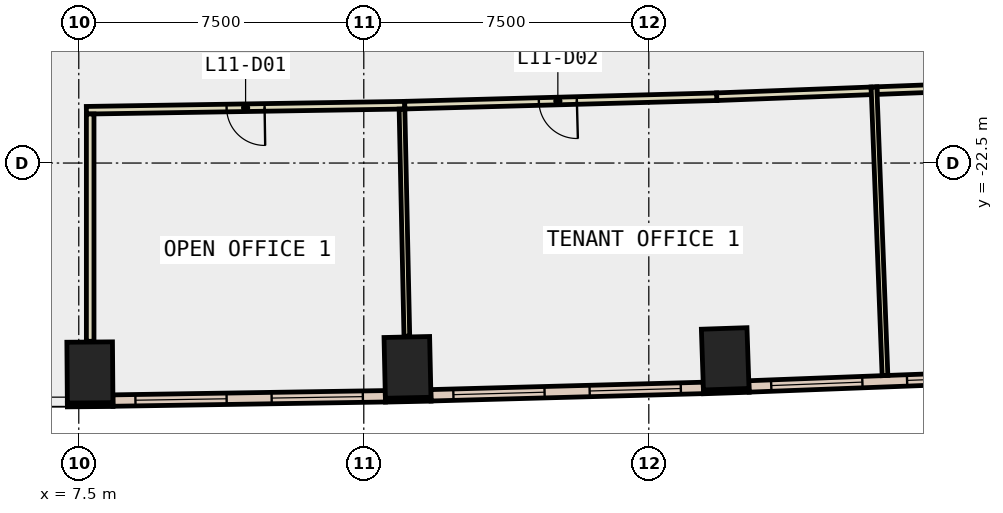
"""IFC4 building model, lengths in metres.
Left out: names, types, materials, properties, quantities, classifications, styles, units other than length and angle.
Written with IfcOpenShell. Run it as: python <this file> out.ifc"""

import sys

from ifc_helpers import new_model, si_unit, direction, frame, frame_2d, origin, origin_2d, place, context, subcontext, project, spatial, rectangle, extrude, element, fill, save


model = new_model("IFC4")
c1 = context("Model", 3, precision=1e-05, world=origin(), true_north=direction((0.0, 1.0)))
c2 = subcontext(c1, "Body", "Model", "MODEL_VIEW")
j1 = project(units=[si_unit("LENGTHUNIT", "METRE"), si_unit("PLANEANGLEUNIT", "RADIAN")], contexts=[c1])
p1 = place(None, origin())
s1 = spatial("IfcSite", under=j1, at=p1, CompositionType="ELEMENT")
p2 = place(p1, origin())
s2 = spatial("IfcBuilding", under=s1, at=p2, CompositionType="ELEMENT")
p3 = place(p2, frame((0.0, 0.0, 56.0)))
s3 = spatial("IfcBuildingStorey", under=s2, at=p3, CompositionType="ELEMENT", Elevation=56.0)
for number, where, z_axis, x_axis in (
    (1, (7.793, -28.01, -0.4), (0.0, 0.0, 1.0), (1.0, 0.008, 0.0)),
    (2, (16.15, -27.877, -0.4), (0.0, 0.0, 1.0), (1.0, 0.022, 0.0)),
    (3, (24.51, -27.652, -0.4), (0.0, 0.0, 1.0), (0.999, 0.034, 0.0)),
):
    element("IfcColumn", number, at=place(p3, frame(where, z_axis=z_axis, x_axis=x_axis)), inside=s3, PredefinedType="COLUMN", context=c2, shape_type="SweptSolid", body=[
        extrude(rectangle(XDim=1.2, YDim=1.6, at=origin_2d()), origin(), (0.0, 0.0, 1.0), 4.2),
    ])
p4 = place(p3, frame((7.2, -28.865, 0.0), z_axis=(0.0, 0.0, 1.0), x_axis=(0.999965208912, 0.008341520563, 0.0)))
e4 = element("IfcWall", 4, at=p4, inside=s3, PredefinedType="STANDARD", context=c2, shape_type="SweptSolid", body=[
    extrude(rectangle(XDim=1.2, YDim=0.1, at=frame_2d((0.6, 0.0))), origin(), (0.0, 0.0, 1.0), 3.8),
])
p5 = place(p3, frame((15.569, -28.74, 0.0), z_axis=(0.0, 0.0, 1.0), x_axis=(0.99976752127, 0.021561618973, 0.0)))
e5 = element("IfcWall", 5, at=p5, inside=s3, PredefinedType="STANDARD", context=c2, shape_type="SweptSolid", body=[
    extrude(rectangle(XDim=1.2, YDim=0.1, at=frame_2d((0.6, 0.0))), origin(), (0.0, 0.0, 1.0), 3.8),
])
p6 = place(p3, frame((23.939, -28.521, 0.0), z_axis=(0.0, 0.0, 1.0), x_axis=(0.999442872267, 0.03337581573, 0.0)))
e6 = element("IfcWall", 6, at=p6, inside=s3, PredefinedType="STANDARD", context=c2, shape_type="SweptSolid", body=[
    extrude(rectangle(XDim=1.2, YDim=0.1, at=frame_2d((0.6, 0.0))), origin(), (0.0, 0.0, 1.0), 3.8),
])
p7 = place(p3, frame((8.398, -28.75, 0.0), z_axis=(0.0, 0.0, 1.0), x_axis=(0.999875756772, 0.015762963512, 0.0)))
e7 = element("IfcWall", 7, at=p7, inside=s3, PredefinedType="STANDARD", context=c2, shape_type="SweptSolid", body=[
    extrude(rectangle(XDim=7.171, YDim=0.3, at=frame_2d((3.585, 0.0))), origin(), (0.0, 0.0, 1.0), 3.8),
])
p8 = place(p7, frame((0.593, 0.0, 0.9)))
e8 = element("IfcOpeningElement", 8, at=p8, cuts=e7, PredefinedType="OPENING", context=c2, shape_type="SweptSolid", body=[
    extrude(rectangle(XDim=2.4, YDim=2.6, at=frame_2d((1.2, 1.3))), frame((0.0, 0.16, 0.0), z_axis=(0.0, -1.0, 0.0), x_axis=(1.0, 0.0, 0.0)), (0.0, 0.0, 1.0), 0.32),
])
p9 = place(p7, frame((4.178, 0.0, 0.9)))
e9 = element("IfcOpeningElement", 9, at=p9, cuts=e7, PredefinedType="OPENING", context=c2, shape_type="SweptSolid", body=[
    extrude(rectangle(XDim=2.4, YDim=2.6, at=frame_2d((1.2, 1.3))), frame((0.0, 0.16, 0.0), z_axis=(0.0, -1.0, 0.0), x_axis=(1.0, 0.0, 0.0)), (0.0, 0.0, 1.0), 0.32),
])
p10 = place(p3, frame((16.765, -28.611, 0.0), z_axis=(0.0, 0.0, 1.0), x_axis=(0.999633925798, 0.027055764512, 0.0)))
e10 = element("IfcWall", 10, at=p10, inside=s3, PredefinedType="STANDARD", context=c2, shape_type="SweptSolid", body=[
    extrude(rectangle(XDim=7.174, YDim=0.3, at=frame_2d((3.587, 0.0))), origin(), (0.0, 0.0, 1.0), 3.8),
])
p11 = place(p10, frame((0.593, 0.0, 0.9)))
e11 = element("IfcOpeningElement", 11, at=p11, cuts=e10, PredefinedType="OPENING", context=c2, shape_type="SweptSolid", body=[
    extrude(rectangle(XDim=2.4, YDim=2.6, at=frame_2d((1.2, 1.3))), frame((0.0, 0.16, 0.0), z_axis=(0.0, -1.0, 0.0), x_axis=(1.0, 0.0, 0.0)), (0.0, 0.0, 1.0), 0.32),
])
p12 = place(p10, frame((4.18, 0.0, 0.9)))
e12 = element("IfcOpeningElement", 12, at=p12, cuts=e10, PredefinedType="OPENING", context=c2, shape_type="SweptSolid", body=[
    extrude(rectangle(XDim=2.4, YDim=2.6, at=frame_2d((1.2, 1.3))), frame((0.0, 0.16, 0.0), z_axis=(0.0, -1.0, 0.0), x_axis=(1.0, 0.0, 0.0)), (0.0, 0.0, 1.0), 0.32),
])
p13 = place(p3, frame((25.134, -28.378, 0.0), z_axis=(0.0, 0.0, 1.0), x_axis=(0.999276920032, 0.038021534562, 0.0)))
e13 = element("IfcWall", 13, at=p13, inside=s3, PredefinedType="STANDARD", context=c2, shape_type="SweptSolid", body=[
    extrude(rectangle(XDim=7.153, YDim=0.3, at=frame_2d((3.577, 0.0))), origin(), (0.0, 0.0, 1.0), 3.8),
])
p14 = place(p13, frame((0.588, 0.0, 0.9)))
e14 = element("IfcOpeningElement", 14, at=p14, cuts=e13, PredefinedType="OPENING", context=c2, shape_type="SweptSolid", body=[
    extrude(rectangle(XDim=2.4, YDim=2.6, at=frame_2d((1.2, 1.3))), frame((0.0, 0.16, 0.0), z_axis=(0.0, -1.0, 0.0), x_axis=(1.0, 0.0, 0.0)), (0.0, 0.0, 1.0), 0.32),
])
p15 = place(p13, frame((4.165, 0.0, 0.9)))
e15 = element("IfcOpeningElement", 15, at=p15, cuts=e13, PredefinedType="OPENING", context=c2, shape_type="SweptSolid", body=[
    extrude(rectangle(XDim=2.4, YDim=2.6, at=frame_2d((1.2, 1.3))), frame((0.0, 0.16, 0.0), z_axis=(0.0, -1.0, 0.0), x_axis=(1.0, 0.0, 0.0)), (0.0, 0.0, 1.0), 0.32),
])
p16 = place(p3, frame((16.078, -20.978, 0.0), z_axis=(0.0, 0.0, 1.0), x_axis=(-0.999873907997, -0.015879801838, 0.0)))
e16 = element("IfcWall", 16, at=p16, inside=s3, PredefinedType="PARTITIONING", context=c2, shape_type="SweptSolid", body=[
    extrude(rectangle(XDim=8.379, YDim=0.2, at=frame_2d((4.189, 0.0))), origin(), (0.0, 0.0, 1.0), 3.8),
])
p17 = place(p16, frame((3.689, 0.0, 0.0)))
e17 = element("IfcOpeningElement", 17, at=p17, cuts=e16, PredefinedType="OPENING", context=c2, shape_type="SweptSolid", body=[
    extrude(rectangle(XDim=1.0, YDim=2.1, at=frame_2d((0.5, 1.05))), frame((0.0, 0.11, 0.0), z_axis=(0.0, -1.0, 0.0), x_axis=(1.0, 0.0, 0.0)), (0.0, 0.0, 1.0), 0.22),
])
p18 = place(p3, frame((28.354, -20.6, 0.0), z_axis=(0.0, 0.0, 1.0), x_axis=(-0.999276945714, -0.038020859604, 0.0)))
e18 = element("IfcWall", 18, at=p18, inside=s3, PredefinedType="PARTITIONING", context=c2, shape_type="SweptSolid", body=[
    extrude(rectangle(XDim=4.071, YDim=0.2, at=frame_2d((2.036, 0.0))), origin(), (0.0, 0.0, 1.0), 3.8),
])
p19 = place(p3, frame((24.286, -20.755, 0.0), z_axis=(0.0, 0.0, 1.0), x_axis=(-0.999633883909, -0.027057312146, 0.0)))
e19 = element("IfcWall", 19, at=p19, inside=s3, PredefinedType="PARTITIONING", context=c2, shape_type="SweptSolid", body=[
    extrude(rectangle(XDim=8.211, YDim=0.2, at=frame_2d((4.105, 0.0))), origin(), (0.0, 0.0, 1.0), 3.8),
])
p20 = place(p19, frame((3.681, 0.0, 0.0)))
e20 = element("IfcOpeningElement", 20, at=p20, cuts=e19, PredefinedType="OPENING", context=c2, shape_type="SweptSolid", body=[
    extrude(rectangle(XDim=1.0, YDim=2.1, at=frame_2d((0.5, 1.05))), frame((0.0, 0.11, 0.0), z_axis=(0.0, -1.0, 0.0), x_axis=(1.0, 0.0, 0.0)), (0.0, 0.0, 1.0), 0.22),
])
p21 = place(p3, frame((31.909, -20.464, 0.0), z_axis=(0.0, 0.0, 1.0), x_axis=(-0.999273295147, -0.038116684091, 0.0)))
e21 = element("IfcWall", 21, at=p21, inside=s3, PredefinedType="PARTITIONING", context=c2, shape_type="SweptSolid", body=[
    extrude(rectangle(XDim=3.407, YDim=0.2, at=frame_2d((1.704, 0.0))), origin(), (0.0, 0.0, 1.0), 3.8),
])
p22 = place(p3, frame((7.8, -21.209, 0.0), z_axis=(0.0, 0.0, 1.0), x_axis=(0.0, -1.0, 0.0)))
e22 = element("IfcWall", 22, at=p22, inside=s3, PredefinedType="PARTITIONING", context=c2, shape_type="SweptSolid", body=[
    extrude(rectangle(XDim=5.981, YDim=0.2, at=frame_2d((2.99, 0.0))), origin(), (0.0, 0.0, 1.0), 3.8),
])
p23 = place(p3, frame((16.005, -21.079, 0.0), z_axis=(0.0, 0.0, 1.0), x_axis=(0.021436771826, -0.999770206004, 0.0)))
e23 = element("IfcWall", 23, at=p23, inside=s3, PredefinedType="PARTITIONING", context=c2, shape_type="SweptSolid", body=[
    extrude(rectangle(XDim=5.979, YDim=0.15, at=frame_2d((2.99, 0.0))), origin(), (0.0, 0.0, 1.0), 3.8),
])
p24 = place(p3, frame((28.425, -20.497, 0.0), z_axis=(0.0, 0.0, 1.0), x_axis=(0.03816049016, -0.999271623229, 0.0)))
e24 = element("IfcWall", 24, at=p24, inside=s3, PredefinedType="PARTITIONING", context=c2, shape_type="SweptSolid", body=[
    extrude(rectangle(XDim=7.601, YDim=0.15, at=frame_2d((3.8, 0.0))), origin(), (0.0, 0.0, 1.0), 3.8),
])
p25 = place(p8, origin())
e25 = element("IfcWindow", 25, at=p25, inside=s3, PartitioningType="SINGLE_PANEL", PredefinedType="WINDOW", context=c2, shape_type="SweptSolid", body=[
    extrude(rectangle(XDim=2.4, YDim=2.6, at=frame_2d((1.2, 1.3))), frame((0.0, 0.03, 0.0), z_axis=(0.0, -1.0, 0.0), x_axis=(1.0, 0.0, 0.0)), (0.0, 0.0, 1.0), 0.06),
])
fill(e8, e25)
p26 = place(p9, origin())
e26 = element("IfcWindow", 26, at=p26, inside=s3, PartitioningType="SINGLE_PANEL", PredefinedType="WINDOW", context=c2, shape_type="SweptSolid", body=[
    extrude(rectangle(XDim=2.4, YDim=2.6, at=frame_2d((1.2, 1.3))), frame((0.0, 0.03, 0.0), z_axis=(0.0, -1.0, 0.0), x_axis=(1.0, 0.0, 0.0)), (0.0, 0.0, 1.0), 0.06),
])
fill(e9, e26)
p27 = place(p11, origin())
e27 = element("IfcWindow", 27, at=p27, inside=s3, PartitioningType="SINGLE_PANEL", PredefinedType="WINDOW", context=c2, shape_type="SweptSolid", body=[
    extrude(rectangle(XDim=2.4, YDim=2.6, at=frame_2d((1.2, 1.3))), frame((0.0, 0.03, 0.0), z_axis=(0.0, -1.0, 0.0), x_axis=(1.0, 0.0, 0.0)), (0.0, 0.0, 1.0), 0.06),
])
fill(e11, e27)
p28 = place(p12, origin())
e28 = element("IfcWindow", 28, at=p28, inside=s3, PartitioningType="SINGLE_PANEL", PredefinedType="WINDOW", context=c2, shape_type="SweptSolid", body=[
    extrude(rectangle(XDim=2.4, YDim=2.6, at=frame_2d((1.2, 1.3))), frame((0.0, 0.03, 0.0), z_axis=(0.0, -1.0, 0.0), x_axis=(1.0, 0.0, 0.0)), (0.0, 0.0, 1.0), 0.06),
])
fill(e12, e28)
p29 = place(p14, origin())
e29 = element("IfcWindow", 29, at=p29, inside=s3, PartitioningType="SINGLE_PANEL", PredefinedType="WINDOW", context=c2, shape_type="SweptSolid", body=[
    extrude(rectangle(XDim=2.4, YDim=2.6, at=frame_2d((1.2, 1.3))), frame((0.0, 0.03, 0.0), z_axis=(0.0, -1.0, 0.0), x_axis=(1.0, 0.0, 0.0)), (0.0, 0.0, 1.0), 0.06),
])
fill(e14, e29)
p30 = place(p15, origin())
e30 = element("IfcWindow", 30, at=p30, inside=s3, PartitioningType="SINGLE_PANEL", PredefinedType="WINDOW", context=c2, shape_type="SweptSolid", body=[
    extrude(rectangle(XDim=2.4, YDim=2.6, at=frame_2d((1.2, 1.3))), frame((0.0, 0.03, 0.0), z_axis=(0.0, -1.0, 0.0), x_axis=(1.0, 0.0, 0.0)), (0.0, 0.0, 1.0), 0.06),
])
fill(e15, e30)
p31 = place(p17, origin())
e31 = element("IfcDoor", 31, at=p31, inside=s3, OperationType="SINGLE_SWING_RIGHT", PredefinedType="DOOR", context=c2, shape_type="SweptSolid", body=[
    extrude(rectangle(XDim=1.0, YDim=2.1, at=frame_2d((0.5, 1.05))), frame((0.0, 0.025, 0.0), z_axis=(0.0, -1.0, 0.0), x_axis=(1.0, 0.0, 0.0)), (0.0, 0.0, 1.0), 0.05),
])
fill(e17, e31)
p32 = place(p20, origin())
e32 = element("IfcDoor", 32, at=p32, inside=s3, OperationType="SINGLE_SWING_RIGHT", PredefinedType="DOOR", context=c2, shape_type="SweptSolid", body=[
    extrude(rectangle(XDim=1.0, YDim=2.1, at=frame_2d((0.5, 1.05))), frame((0.0, 0.025, 0.0), z_axis=(0.0, -1.0, 0.0), x_axis=(1.0, 0.0, 0.0)), (0.0, 0.0, 1.0), 0.05),
])
fill(e20, e32)
save(model, sys.argv[1])
